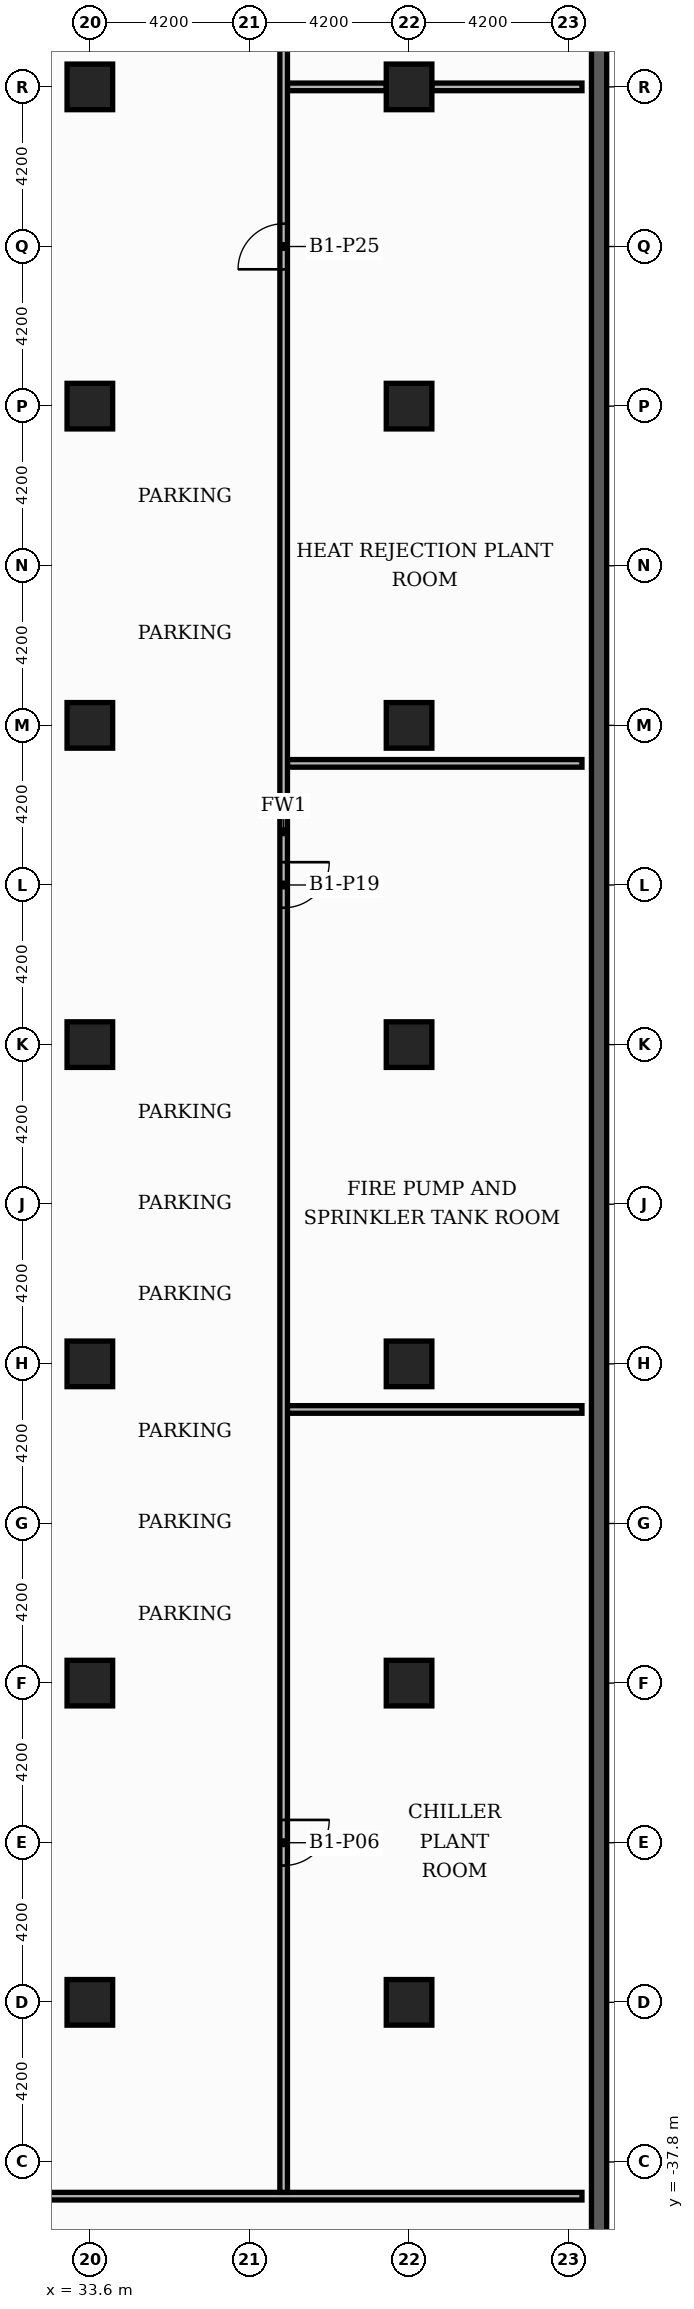
"""IFC4 building model, lengths in metres.
Left out: names, types, materials, properties, quantities, classifications, styles, units other than length and angle.
Written with IfcOpenShell. Run it as: python <this file> out.ifc"""

import sys

from ifc_helpers import new_model, si_unit, direction, frame, frame_2d, origin, origin_2d, place, context, subcontext, project, spatial, rectangle, extrude, element, fill, save


model = new_model("IFC4")
c1 = context("Model", 3, precision=1e-05, world=origin(), true_north=direction((0.0, 1.0)))
c2 = subcontext(c1, "Body", "Model", "MODEL_VIEW")
j1 = project(units=[si_unit("LENGTHUNIT", "METRE"), si_unit("PLANEANGLEUNIT", "RADIAN")], contexts=[c1])
p1 = place(None, origin())
s1 = spatial("IfcSite", under=j1, at=p1, CompositionType="ELEMENT")
p2 = place(p1, origin())
s2 = spatial("IfcBuilding", under=s1, at=p2, CompositionType="ELEMENT")
p3 = place(p2, frame((0.0, 0.0, -4.2)))
s3 = spatial("IfcBuildingStorey", under=s2, at=p3, CompositionType="ELEMENT", Elevation=-4.2)
p4 = place(p3, frame((47.0, -46.8, 0.0), z_axis=(0.0, 0.0, 1.0), x_axis=(0.0, 1.0, 0.0)))
e1 = element("IfcWall", 1, at=p4, inside=s3, PredefinedType="USERDEFINED", context=c2, shape_type="SweptSolid", body=[
    extrude(rectangle(XDim=93.6, YDim=0.4, at=frame_2d((46.8, 0.0))), origin(), (0.0, 0.0, 1.0), 4.2),
])
for number, where, z_axis, x_axis in (
    (2, (33.6, 0.0, 0.0), (0.0, 0.0, 1.0), (1.0, 0.0, 0.0)),
    (3, (33.6, 8.4, 0.0), (0.0, 0.0, 1.0), (1.0, 0.0, 0.0)),
    (4, (33.6, 16.8, 0.0), (0.0, 0.0, 1.0), (1.0, 0.0, 0.0)),
    (5, (33.6, -8.4, 0.0), (0.0, 0.0, 1.0), (1.0, 0.0, 0.0)),
    (6, (33.6, -16.8, 0.0), (0.0, 0.0, 1.0), (1.0, 0.0, 0.0)),
    (7, (33.6, -25.2, 0.0), (0.0, 0.0, 1.0), (1.0, 0.0, 0.0)),
    (8, (33.6, -33.6, 0.0), (0.0, 0.0, 1.0), (1.0, 0.0, 0.0)),
    (9, (42.0, 0.0, 0.0), (0.0, 0.0, 1.0), (1.0, 0.0, 0.0)),
    (10, (42.0, 8.4, 0.0), (0.0, 0.0, 1.0), (1.0, 0.0, 0.0)),
    (11, (42.0, 16.8, 0.0), (0.0, 0.0, 1.0), (1.0, 0.0, 0.0)),
    (12, (42.0, -8.4, 0.0), (0.0, 0.0, 1.0), (1.0, 0.0, 0.0)),
    (13, (42.0, -16.8, 0.0), (0.0, 0.0, 1.0), (1.0, 0.0, 0.0)),
    (14, (42.0, -25.2, 0.0), (0.0, 0.0, 1.0), (1.0, 0.0, 0.0)),
    (15, (42.0, -33.6, 0.0), (0.0, 0.0, 1.0), (1.0, 0.0, 0.0)),
):
    element("IfcColumn", number, at=place(p3, frame(where, z_axis=z_axis, x_axis=x_axis)), inside=s3, PredefinedType="COLUMN", context=c2, shape_type="SweptSolid", body=[
        extrude(rectangle(XDim=1.2, YDim=1.2, at=origin_2d()), origin(), (0.0, 0.0, 1.0), 4.2),
    ])
p5 = place(p3, frame((16.7, -38.7, 0.0), z_axis=(0.0, 0.0, 1.0), x_axis=(1.0, 0.0, 0.0)))
e16 = element("IfcWall", 16, at=p5, inside=s3, PredefinedType="PARTITIONING", context=c2, shape_type="SweptSolid", body=[
    extrude(rectangle(XDim=29.85, YDim=0.2, at=frame_2d((14.925, 0.0))), origin(), (0.0, 0.0, 1.0), 3.78),
])
p6 = place(p5, frame((12.1, 0.0, 0.0)))
e17 = element("IfcOpeningElement", 17, at=p6, cuts=e16, PredefinedType="OPENING", context=c2, shape_type="SweptSolid", body=[
    extrude(rectangle(XDim=1.2, YDim=2.2, at=frame_2d((0.6, 1.1))), frame((0.0, 0.11, 0.0), z_axis=(0.0, -1.0, 0.0), x_axis=(1.0, 0.0, 0.0)), (0.0, 0.0, 1.0), 0.22),
])
for number, where, z_axis, x_axis in (
    (18, (38.8, -18.0, 0.0), (0.0, 0.0, 1.0), (1.0, 0.0, 0.0)),
    (19, (38.8, -1.0, 0.0), (0.0, 0.0, 1.0), (1.0, 0.0, 0.0)),
):
    element("IfcWall", number, at=place(p3, frame(where, z_axis=z_axis, x_axis=x_axis)), inside=s3, PredefinedType="PARTITIONING", context=c2, shape_type="SweptSolid", body=[
        extrude(rectangle(XDim=7.75, YDim=0.2, at=frame_2d((3.875, 0.0))), origin(), (0.0, 0.0, 1.0), 3.78),
    ])
p7 = place(p3, frame((38.8, 16.8, 0.0), z_axis=(0.0, 0.0, 1.0), x_axis=(1.0, 0.0, 0.0)))
e20 = element("IfcWall", 20, at=p7, inside=s3, PredefinedType="PARTITIONING", context=c2, shape_type="SweptSolid", body=[
    extrude(rectangle(XDim=2.6, YDim=0.2, at=frame_2d((1.3, 0.0))), origin(), (0.0, 0.0, 1.0), 3.78),
])
p8 = place(p3, frame((42.6, 16.8, 0.0), z_axis=(0.0, 0.0, 1.0), x_axis=(1.0, 0.0, 0.0)))
e21 = element("IfcWall", 21, at=p8, inside=s3, PredefinedType="PARTITIONING", context=c2, shape_type="SweptSolid", body=[
    extrude(rectangle(XDim=3.95, YDim=0.2, at=frame_2d((1.975, 0.0))), origin(), (0.0, 0.0, 1.0), 3.78),
])
p9 = place(p3, frame((38.7, -38.6, 0.0), z_axis=(0.0, 0.0, 1.0), x_axis=(0.0, 1.0, 0.0)))
e22 = element("IfcWall", 22, at=p9, inside=s3, PredefinedType="PARTITIONING", context=c2, shape_type="SweptSolid", body=[
    extrude(rectangle(XDim=71.6, YDim=0.2, at=frame_2d((35.8, 0.0))), origin(), (0.0, 0.0, 1.0), 3.78),
])
p10 = place(p9, frame((8.6, 0.0, 0.0)))
e23 = element("IfcOpeningElement", 23, at=p10, cuts=e22, PredefinedType="OPENING", context=c2, shape_type="SweptSolid", body=[
    extrude(rectangle(XDim=1.2, YDim=2.2, at=frame_2d((0.6, 1.1))), frame((0.0, 0.11, 0.0), z_axis=(0.0, -1.0, 0.0), x_axis=(1.0, 0.0, 0.0)), (0.0, 0.0, 1.0), 0.22),
])
p11 = place(p9, frame((33.8, 0.0, 0.0)))
e24 = element("IfcOpeningElement", 24, at=p11, cuts=e22, PredefinedType="OPENING", context=c2, shape_type="SweptSolid", body=[
    extrude(rectangle(XDim=1.2, YDim=2.2, at=frame_2d((0.6, 1.1))), frame((0.0, 0.11, 0.0), z_axis=(0.0, -1.0, 0.0), x_axis=(1.0, 0.0, 0.0)), (0.0, 0.0, 1.0), 0.22),
])
p12 = place(p9, frame((50.6, 0.0, 0.0)))
e25 = element("IfcOpeningElement", 25, at=p12, cuts=e22, PredefinedType="OPENING", context=c2, shape_type="SweptSolid", body=[
    extrude(rectangle(XDim=1.2, YDim=2.2, at=frame_2d((0.6, 1.1))), frame((0.0, 0.11, 0.0), z_axis=(0.0, -1.0, 0.0), x_axis=(1.0, 0.0, 0.0)), (0.0, 0.0, 1.0), 0.22),
])
p13 = place(p9, frame((67.4, 0.0, 0.0)))
e26 = element("IfcOpeningElement", 26, at=p13, cuts=e22, PredefinedType="OPENING", context=c2, shape_type="SweptSolid", body=[
    extrude(rectangle(XDim=1.2, YDim=2.2, at=frame_2d((0.6, 1.1))), frame((0.0, 0.11, 0.0), z_axis=(0.0, -1.0, 0.0), x_axis=(1.0, 0.0, 0.0)), (0.0, 0.0, 1.0), 0.22),
])
p14 = place(p10, origin())
e27 = element("IfcDoor", 27, at=p14, inside=s3, OperationType="SINGLE_SWING_RIGHT", PredefinedType="DOOR", context=c2, shape_type="SweptSolid", body=[
    extrude(rectangle(XDim=1.2, YDim=2.2, at=frame_2d((0.6, 1.1))), frame((0.0, 0.025, 0.0), z_axis=(0.0, -1.0, 0.0), x_axis=(1.0, 0.0, 0.0)), (0.0, 0.0, 1.0), 0.05),
])
fill(e23, e27)
p15 = place(p11, origin())
e28 = element("IfcDoor", 28, at=p15, inside=s3, OperationType="SINGLE_SWING_RIGHT", PredefinedType="DOOR", context=c2, shape_type="SweptSolid", body=[
    extrude(rectangle(XDim=1.2, YDim=2.2, at=frame_2d((0.6, 1.1))), frame((0.0, 0.025, 0.0), z_axis=(0.0, -1.0, 0.0), x_axis=(1.0, 0.0, 0.0)), (0.0, 0.0, 1.0), 0.05),
])
fill(e24, e28)
p16 = place(p12, origin())
e29 = element("IfcDoor", 29, at=p16, inside=s3, OperationType="SINGLE_SWING_LEFT", PredefinedType="DOOR", context=c2, shape_type="SweptSolid", body=[
    extrude(rectangle(XDim=1.2, YDim=2.2, at=frame_2d((0.6, 1.1))), frame((0.0, 0.025, 0.0), z_axis=(0.0, -1.0, 0.0), x_axis=(1.0, 0.0, 0.0)), (0.0, 0.0, 1.0), 0.05),
])
fill(e25, e29)
save(model, sys.argv[1])
